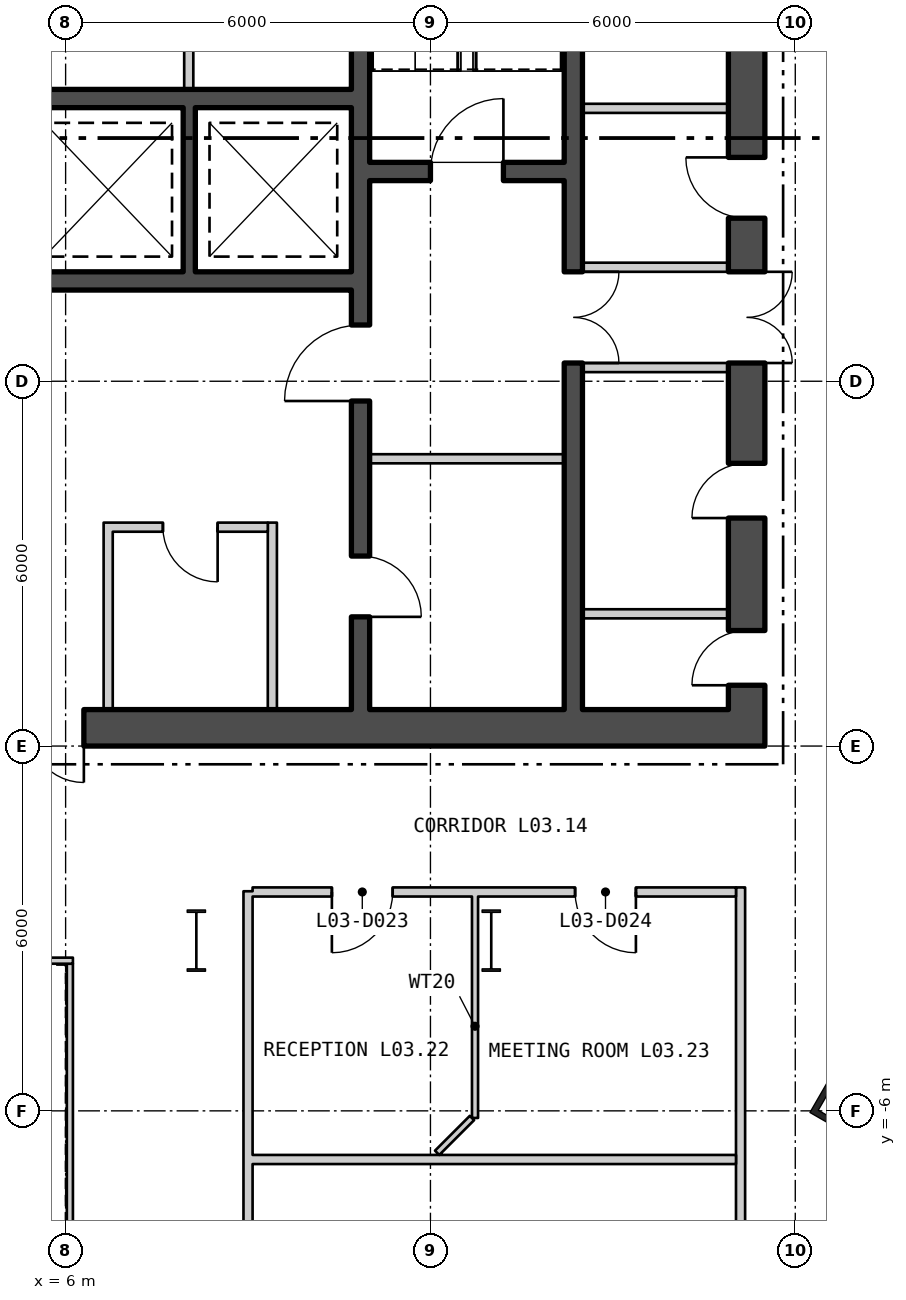
"""IFC4 building model, lengths in metres.
Left out: names, types, materials, properties, quantities, classifications, styles, units other than length and angle.
Written with IfcOpenShell. Run it as: python <this file> out.ifc"""

import sys

from ifc_helpers import new_model, si_unit, direction, frame, frame_2d, origin, origin_2d, place, context, subcontext, project, spatial, rectangle, hollow_rectangle, i_section, extrude, element, fill, save


model = new_model("IFC4")
c1 = context("Model", 3, precision=1e-05, world=origin(), true_north=direction((0.0, 1.0)))
c2 = subcontext(c1, "Body", "Model", "MODEL_VIEW")
j1 = project(units=[si_unit("LENGTHUNIT", "METRE"), si_unit("PLANEANGLEUNIT", "RADIAN")], contexts=[c1])
p1 = place(None, origin())
s1 = spatial("IfcSite", under=j1, at=p1, CompositionType="ELEMENT")
p2 = place(p1, origin())
s2 = spatial("IfcBuilding", under=s1, at=p2, CompositionType="ELEMENT")
p3 = place(p2, frame((0.0, 0.0, 18.6)))
s3 = spatial("IfcBuildingStorey", under=s2, at=p3, CompositionType="ELEMENT", Elevation=18.6)
p4 = place(p3, frame((19.061, -5.807, 0.0), z_axis=(0.0, 0.0, 1.0), x_axis=(0.5, 0.866025403784, 0.0)))
e1 = element("IfcColumn", 1, at=p4, inside=s3, PredefinedType="COLUMN", context=c2, shape_type="SweptSolid", body=[
    extrude(hollow_rectangle(XDim=1.2, YDim=1.2, WallThickness=0.1, at=origin_2d()), origin(), (0.0, 0.0, 1.0), 5.1),
])
for number, where, z_axis, x_axis in (
    (2, (8.15, -3.2, 0.0), (0.0, 0.0, 1.0), (1.0, 0.0, 0.0)),
    (3, (13.0, -3.2, 0.0), (0.0, 0.0, 1.0), (1.0, 0.0, 0.0)),
):
    element("IfcColumn", number, at=place(p3, frame(where, z_axis=z_axis, x_axis=x_axis)), inside=s3, PredefinedType="COLUMN", context=c2, shape_type="SweptSolid", body=[
        extrude(i_section(OverallWidth=0.302, OverallDepth=1.008, WebThickness=0.021, FlangeThickness=0.04, at=origin_2d()), origin(), (0.0, 0.0, 1.0), 5.1),
    ])
p5 = place(p3, frame((6.07, -11.62, 0.0), z_axis=(0.0, 0.0, 1.0), x_axis=(0.0, 1.0, 0.0)))
e4 = element("IfcWall", 4, at=p5, inside=s3, PredefinedType="PARTITIONING", context=c2, shape_type="SweptSolid", body=[
    extrude(rectangle(XDim=8.04, YDim=0.1, at=frame_2d((4.02, 0.0))), origin(), (0.0, 0.0, 1.0), 4.88),
])
p6 = place(p3, frame((6.12, -3.53, 0.0), z_axis=(0.0, 0.0, 1.0), x_axis=(-1.0, 0.0, 0.0)))
e5 = element("IfcWall", 5, at=p6, inside=s3, PredefinedType="PARTITIONING", context=c2, shape_type="SweptSolid", body=[
    extrude(rectangle(XDim=12.24, YDim=0.1, at=frame_2d((6.12, 0.0))), origin(), (0.0, 0.0, 1.0), 4.88),
])
p7 = place(p3, frame((-17.5, 0.3, 0.0), z_axis=(0.0, 0.0, 1.0), x_axis=(1.0, 0.0, 0.0)))
e6 = element("IfcWall", 6, at=p7, inside=s3, PredefinedType="SHEAR", context=c2, shape_type="SweptSolid", body=[
    extrude(rectangle(XDim=35.0, YDim=0.6, at=frame_2d((17.5, 0.0))), origin(), (0.0, 0.0, 1.0), 4.88),
])
p8 = place(p7, frame((12.0, 0.0, 0.0)))
e7 = element("IfcOpeningElement", 7, at=p8, cuts=e6, PredefinedType="OPENING", context=c2, shape_type="SweptSolid", body=[
    extrude(rectangle(XDim=1.8, YDim=2.4, at=frame_2d((0.9, 1.2))), frame((0.0, 0.31, 0.0), z_axis=(0.0, -1.0, 0.0), x_axis=(1.0, 0.0, 0.0)), (0.0, 0.0, 1.0), 0.62),
])
p9 = place(p7, frame((22.0, 0.0, 0.0)))
e8 = element("IfcOpeningElement", 8, at=p9, cuts=e6, PredefinedType="OPENING", context=c2, shape_type="SweptSolid", body=[
    extrude(rectangle(XDim=1.8, YDim=2.4, at=frame_2d((0.9, 1.2))), frame((0.0, 0.31, 0.0), z_axis=(0.0, -1.0, 0.0), x_axis=(1.0, 0.0, 0.0)), (0.0, 0.0, 1.0), 0.62),
])
p10 = place(p3, frame((17.2, 0.6, 0.0), z_axis=(0.0, 0.0, 1.0), x_axis=(0.0, 1.0, 0.0)))
e9 = element("IfcWall", 9, at=p10, inside=s3, PredefinedType="SHEAR", context=c2, shape_type="SweptSolid", body=[
    extrude(rectangle(XDim=16.8, YDim=0.6, at=frame_2d((8.4, 0.0))), origin(), (0.0, 0.0, 1.0), 4.88),
])
p11 = place(p10, frame((5.7, 0.0, 0.0)))
e10 = element("IfcOpeningElement", 10, at=p11, cuts=e9, PredefinedType="OPENING", context=c2, shape_type="SweptSolid", body=[
    extrude(rectangle(XDim=1.5, YDim=2.1, at=frame_2d((0.75, 1.05))), frame((0.0, 0.31, 0.0), z_axis=(0.0, -1.0, 0.0), x_axis=(1.0, 0.0, 0.0)), (0.0, 0.0, 1.0), 0.62),
])
p12 = place(p10, frame((0.4, 0.0, 0.0)))
e11 = element("IfcOpeningElement", 11, at=p12, cuts=e9, PredefinedType="OPENING", context=c2, shape_type="SweptSolid", body=[
    extrude(rectangle(XDim=0.9, YDim=2.1, at=frame_2d((0.45, 1.05))), frame((0.0, 0.31, 0.0), z_axis=(0.0, -1.0, 0.0), x_axis=(1.0, 0.0, 0.0)), (0.0, 0.0, 1.0), 0.62),
])
p13 = place(p10, frame((3.15, 0.0, 0.0)))
e12 = element("IfcOpeningElement", 12, at=p13, cuts=e9, PredefinedType="OPENING", context=c2, shape_type="SweptSolid", body=[
    extrude(rectangle(XDim=0.9, YDim=2.1, at=frame_2d((0.45, 1.05))), frame((0.0, 0.31, 0.0), z_axis=(0.0, -1.0, 0.0), x_axis=(1.0, 0.0, 0.0)), (0.0, 0.0, 1.0), 0.62),
])
p14 = place(p10, frame((8.082, 0.0, 0.0)))
e13 = element("IfcOpeningElement", 13, at=p14, cuts=e9, PredefinedType="OPENING", context=c2, shape_type="SweptSolid", body=[
    extrude(rectangle(XDim=1.0, YDim=2.1, at=frame_2d((0.5, 1.05))), frame((0.0, 0.31, 0.0), z_axis=(0.0, -1.0, 0.0), x_axis=(1.0, 0.0, 0.0)), (0.0, 0.0, 1.0), 0.62),
])
p15 = place(p10, frame((11.801, 0.0, 0.0)))
e14 = element("IfcOpeningElement", 14, at=p15, cuts=e9, PredefinedType="OPENING", context=c2, shape_type="SweptSolid", body=[
    extrude(rectangle(XDim=0.9, YDim=2.1, at=frame_2d((0.45, 1.05))), frame((0.0, 0.31, 0.0), z_axis=(0.0, -1.0, 0.0), x_axis=(1.0, 0.0, 0.0)), (0.0, 0.0, 1.0), 0.62),
])
p16 = place(p10, frame((15.294, 0.0, 0.0)))
e15 = element("IfcOpeningElement", 15, at=p16, cuts=e9, PredefinedType="OPENING", context=c2, shape_type="SweptSolid", body=[
    extrude(rectangle(XDim=0.9, YDim=2.1, at=frame_2d((0.45, 1.05))), frame((0.0, 0.31, 0.0), z_axis=(0.0, -1.0, 0.0), x_axis=(1.0, 0.0, 0.0)), (0.0, 0.0, 1.0), 0.62),
])
p17 = place(p3, frame((10.85, 0.6, 0.0), z_axis=(0.0, 0.0, 1.0), x_axis=(0.0, 1.0, 0.0)))
e16 = element("IfcWall", 16, at=p17, inside=s3, PredefinedType="SHEAR", context=c2, shape_type="SweptSolid", body=[
    extrude(rectangle(XDim=16.8, YDim=0.3, at=frame_2d((8.4, 0.0))), origin(), (0.0, 0.0, 1.0), 4.88),
])
p18 = place(p17, frame((5.075, 0.0, 0.0)))
e17 = element("IfcOpeningElement", 17, at=p18, cuts=e16, PredefinedType="OPENING", context=c2, shape_type="SweptSolid", body=[
    extrude(rectangle(XDim=1.25, YDim=2.1, at=frame_2d((0.625, 1.05))), frame((0.0, 0.16, 0.0), z_axis=(0.0, -1.0, 0.0), x_axis=(1.0, 0.0, 0.0)), (0.0, 0.0, 1.0), 0.32),
])
p19 = place(p17, frame((1.525, 0.0, 0.0)))
e18 = element("IfcOpeningElement", 18, at=p19, cuts=e16, PredefinedType="OPENING", context=c2, shape_type="SweptSolid", body=[
    extrude(rectangle(XDim=1.0, YDim=2.1, at=frame_2d((0.5, 1.05))), frame((0.0, 0.16, 0.0), z_axis=(0.0, -1.0, 0.0), x_axis=(1.0, 0.0, 0.0)), (0.0, 0.0, 1.0), 0.32),
])
p20 = place(p3, frame((14.35, 0.6, 0.0), z_axis=(0.0, 0.0, 1.0), x_axis=(0.0, 1.0, 0.0)))
e19 = element("IfcWall", 19, at=p20, inside=s3, PredefinedType="SHEAR", context=c2, shape_type="SweptSolid", body=[
    extrude(rectangle(XDim=16.8, YDim=0.3, at=frame_2d((8.4, 0.0))), origin(), (0.0, 0.0, 1.0), 4.88),
])
p21 = place(p20, frame((5.7, 0.0, 0.0)))
e20 = element("IfcOpeningElement", 20, at=p21, cuts=e19, PredefinedType="OPENING", context=c2, shape_type="SweptSolid", body=[
    extrude(rectangle(XDim=1.5, YDim=2.1, at=frame_2d((0.75, 1.05))), frame((0.0, 0.16, 0.0), z_axis=(0.0, -1.0, 0.0), x_axis=(1.0, 0.0, 0.0)), (0.0, 0.0, 1.0), 0.32),
])
p22 = place(p3, frame((11.0, 9.45, 0.0), z_axis=(0.0, 0.0, 1.0), x_axis=(1.0, 0.0, 0.0)))
e21 = element("IfcWall", 21, at=p22, inside=s3, PredefinedType="SHEAR", context=c2, shape_type="SweptSolid", body=[
    extrude(rectangle(XDim=3.2, YDim=0.3, at=frame_2d((1.6, 0.0))), origin(), (0.0, 0.0, 1.0), 4.88),
])
p23 = place(p22, frame((1.0, 0.0, 0.0)))
e22 = element("IfcOpeningElement", 22, at=p23, cuts=e21, PredefinedType="OPENING", context=c2, shape_type="SweptSolid", body=[
    extrude(rectangle(XDim=1.2, YDim=2.1, at=frame_2d((0.6, 1.05))), frame((0.0, 0.16, 0.0), z_axis=(0.0, -1.0, 0.0), x_axis=(1.0, 0.0, 0.0)), (0.0, 0.0, 1.0), 0.32),
])
for number, where, z_axis, x_axis in (
    (23, (2.6, 10.65, 0.0), (0.0, 0.0, 1.0), (1.0, 0.0, 0.0)),
    (24, (2.6, 7.65, 0.0), (0.0, 0.0, 1.0), (1.0, 0.0, 0.0)),
):
    element("IfcWall", number, at=place(p3, frame(where, z_axis=z_axis, x_axis=x_axis)), inside=s3, PredefinedType="SHEAR", context=c2, shape_type="SweptSolid", body=[
        extrude(rectangle(XDim=8.1, YDim=0.3, at=frame_2d((4.05, 0.0))), origin(), (0.0, 0.0, 1.0), 4.88),
    ])
p24 = place(p3, frame((8.033, 7.8, 0.0), z_axis=(0.0, 0.0, 1.0), x_axis=(0.0, 1.0, 0.0)))
e25 = element("IfcWall", 25, at=p24, inside=s3, PredefinedType="SHEAR", context=c2, shape_type="SweptSolid", body=[
    extrude(rectangle(XDim=2.7, YDim=0.2, at=frame_2d((1.35, 0.0))), origin(), (0.0, 0.0, 1.0), 4.88),
])
p25 = place(p3, frame((8.025, 10.8, 0.0), z_axis=(0.0, 0.0, 1.0), x_axis=(0.0, 1.0, 0.0)))
e26 = element("IfcWall", 26, at=p25, inside=s3, PredefinedType="PARTITIONING", context=c2, shape_type="SweptSolid", body=[
    extrude(rectangle(XDim=3.6, YDim=0.15, at=frame_2d((1.8, 0.0))), origin(), (0.0, 0.0, 1.0), 4.88),
])
p26 = place(p25, frame((1.175, 0.0, 0.0)))
e27 = element("IfcOpeningElement", 27, at=p26, cuts=e26, PredefinedType="OPENING", context=c2, shape_type="SweptSolid", body=[
    extrude(rectangle(XDim=1.25, YDim=2.1, at=frame_2d((0.625, 1.05))), frame((0.0, 0.085, 0.0), z_axis=(0.0, -1.0, 0.0), x_axis=(1.0, 0.0, 0.0)), (0.0, 0.0, 1.0), 0.17),
])
p27 = place(p3, frame((11.0, 4.725, 0.0), z_axis=(0.0, 0.0, 1.0), x_axis=(1.0, 0.0, 0.0)))
e28 = element("IfcWall", 28, at=p27, inside=s3, PredefinedType="PARTITIONING", context=c2, shape_type="SweptSolid", body=[
    extrude(rectangle(XDim=3.2, YDim=0.15, at=frame_2d((1.6, 0.0))), origin(), (0.0, 0.0, 1.0), 4.88),
])
for number, where, z_axis, x_axis in (
    (29, (14.5, 6.225, 0.0), (0.0, 0.0, 1.0), (1.0, 0.0, 0.0)),
    (30, (14.5, 7.875, 0.0), (0.0, 0.0, 1.0), (1.0, 0.0, 0.0)),
    (31, (14.5, 2.175, 0.0), (0.0, 0.0, 1.0), (1.0, 0.0, 0.0)),
    (32, (14.5, 10.489, 0.0), (0.0, 0.0, 1.0), (1.0, 0.0, 0.0)),
):
    element("IfcWall", number, at=place(p3, frame(where, z_axis=z_axis, x_axis=x_axis)), inside=s3, PredefinedType="PARTITIONING", context=c2, shape_type="SweptSolid", body=[
        extrude(rectangle(XDim=2.4, YDim=0.15, at=frame_2d((1.2, 0.0))), origin(), (0.0, 0.0, 1.0), 4.88),
    ])
for number, where, z_axis, x_axis in (
    (33, (6.7, 0.6, 0.0), (0.0, 0.0, 1.0), (0.0, 1.0, 0.0)),
    (34, (9.4, 0.6, 0.0), (0.0, 0.0, 1.0), (0.0, 1.0, 0.0)),
):
    element("IfcWall", number, at=place(p3, frame(where, z_axis=z_axis, x_axis=x_axis)), inside=s3, PredefinedType="PARTITIONING", context=c2, shape_type="SweptSolid", body=[
        extrude(rectangle(XDim=3.075, YDim=0.15, at=frame_2d((1.538, 0.0))), origin(), (0.0, 0.0, 1.0), 4.88),
    ])
p28 = place(p3, frame((6.775, 3.6, 0.0), z_axis=(0.0, 0.0, 1.0), x_axis=(1.0, 0.0, 0.0)))
e35 = element("IfcWall", 35, at=p28, inside=s3, PredefinedType="PARTITIONING", context=c2, shape_type="SweptSolid", body=[
    extrude(rectangle(XDim=2.55, YDim=0.15, at=frame_2d((1.275, 0.0))), origin(), (0.0, 0.0, 1.0), 4.88),
])
p29 = place(p28, frame((0.825, 0.0, 0.0)))
e36 = element("IfcOpeningElement", 36, at=p29, cuts=e35, PredefinedType="OPENING", context=c2, shape_type="SweptSolid", body=[
    extrude(rectangle(XDim=0.9, YDim=2.1, at=frame_2d((0.45, 1.05))), frame((0.0, 0.085, 0.0), z_axis=(0.0, -1.0, 0.0), x_axis=(1.0, 0.0, 0.0)), (0.0, 0.0, 1.0), 0.17),
])
p30 = place(p3, frame((9.0, -13.675, 0.0), z_axis=(0.0, 0.0, 1.0), x_axis=(0.0, 1.0, 0.0)))
e37 = element("IfcWall", 37, at=p30, inside=s3, PredefinedType="PARTITIONING", context=c2, shape_type="SweptSolid", body=[
    extrude(rectangle(XDim=11.287, YDim=0.15, at=frame_2d((5.644, 0.0))), origin(), (0.0, 0.0, 1.0), 4.88),
])
p31 = place(p30, frame((2.821, 0.0, 0.0)))
e38 = element("IfcOpeningElement", 38, at=p31, cuts=e37, PredefinedType="OPENING", context=c2, shape_type="SweptSolid", body=[
    extrude(rectangle(XDim=1.0, YDim=2.1, at=frame_2d((0.5, 1.05))), frame((0.0, 0.085, 0.0), z_axis=(0.0, -1.0, 0.0), x_axis=(1.0, 0.0, 0.0)), (0.0, 0.0, 1.0), 0.17),
])
p32 = place(p3, frame((9.075, -6.8, 0.0), z_axis=(0.0, 0.0, 1.0), x_axis=(1.0, 0.0, 0.0)))
e39 = element("IfcWall", 39, at=p32, inside=s3, PredefinedType="PARTITIONING", context=c2, shape_type="SweptSolid", body=[
    extrude(rectangle(XDim=7.95, YDim=0.15, at=frame_2d((3.975, 0.0))), origin(), (0.0, 0.0, 1.0), 4.88),
])
p33 = place(p3, frame((9.075, -2.4, 0.0), z_axis=(0.0, 0.0, 1.0), x_axis=(1.0, 0.0, 0.0)))
e40 = element("IfcWall", 40, at=p33, inside=s3, PredefinedType="PARTITIONING", context=c2, shape_type="SweptSolid", body=[
    extrude(rectangle(XDim=7.95, YDim=0.15, at=frame_2d((3.975, 0.0))), origin(), (0.0, 0.0, 1.0), 4.88),
])
p34 = place(p33, frame((1.304, 0.0, 0.0)))
e41 = element("IfcOpeningElement", 41, at=p34, cuts=e40, PredefinedType="OPENING", context=c2, shape_type="SweptSolid", body=[
    extrude(rectangle(XDim=1.0, YDim=2.1, at=frame_2d((0.5, 1.05))), frame((0.0, 0.085, 0.0), z_axis=(0.0, -1.0, 0.0), x_axis=(1.0, 0.0, 0.0)), (0.0, 0.0, 1.0), 0.17),
])
p35 = place(p33, frame((5.304, 0.0, 0.0)))
e42 = element("IfcOpeningElement", 42, at=p35, cuts=e40, PredefinedType="OPENING", context=c2, shape_type="SweptSolid", body=[
    extrude(rectangle(XDim=1.0, YDim=2.1, at=frame_2d((0.5, 1.05))), frame((0.0, 0.085, 0.0), z_axis=(0.0, -1.0, 0.0), x_axis=(1.0, 0.0, 0.0)), (0.0, 0.0, 1.0), 0.17),
])
p36 = place(p3, frame((12.11, -6.69, 0.0), z_axis=(0.0, 0.0, 1.0), x_axis=(0.707106781187, 0.707106781187, 0.0)))
e43 = element("IfcWall", 43, at=p36, inside=s3, PredefinedType="PARTITIONING", context=c2, shape_type="SweptSolid", body=[
    extrude(rectangle(XDim=0.81, YDim=0.1, at=frame_2d((0.405, 0.0))), origin(), (0.0, 0.0, 1.0), 4.88),
])
p37 = place(p3, frame((12.733, -6.117, 0.0), z_axis=(0.0, 0.0, 1.0), x_axis=(0.0, 1.0, 0.0)))
e44 = element("IfcWall", 44, at=p37, inside=s3, PredefinedType="PARTITIONING", context=c2, shape_type="SweptSolid", body=[
    extrude(rectangle(XDim=3.017, YDim=0.1, at=frame_2d((1.508, 0.0))), origin(), (0.0, 0.0, 1.0), 4.19),
])
p38 = place(p3, frame((12.733, -3.1, 0.0), z_axis=(0.0, 0.0, 1.0), x_axis=(0.0, 1.0, 0.0)))
e45 = element("IfcWall", 45, at=p38, inside=s3, PredefinedType="PARTITIONING", context=c2, shape_type="SweptSolid", body=[
    extrude(rectangle(XDim=0.625, YDim=0.1, at=frame_2d((0.312, 0.0))), origin(), (0.0, 0.0, 1.0), 4.28),
])
p39 = place(p3, frame((17.1, -21.375, 0.0), z_axis=(0.0, 0.0, 1.0), x_axis=(0.0, 1.0, 0.0)))
e46 = element("IfcWall", 46, at=p39, inside=s3, PredefinedType="PARTITIONING", context=c2, shape_type="SweptSolid", body=[
    extrude(rectangle(XDim=19.05, YDim=0.15, at=frame_2d((9.525, 0.0))), origin(), (0.0, 0.0, 1.0), 4.88),
])
p40 = place(p23, origin())
e47 = element("IfcDoor", 47, at=p40, inside=s3, OperationType="SINGLE_SWING_LEFT", PredefinedType="DOOR", context=c2, shape_type="SweptSolid", body=[
    extrude(rectangle(XDim=1.2, YDim=2.1, at=frame_2d((0.6, 1.05))), frame((0.0, 0.025, 0.0), z_axis=(0.0, -1.0, 0.0), x_axis=(1.0, 0.0, 0.0)), (0.0, 0.0, 1.0), 0.05),
])
fill(e22, e47)
p41 = place(p18, origin())
e48 = element("IfcDoor", 48, at=p41, inside=s3, OperationType="SINGLE_SWING_RIGHT", PredefinedType="DOOR", context=c2, shape_type="SweptSolid", body=[
    extrude(rectangle(XDim=1.25, YDim=2.1, at=frame_2d((0.625, 1.05))), frame((0.0, 0.025, 0.0), z_axis=(0.0, -1.0, 0.0), x_axis=(1.0, 0.0, 0.0)), (0.0, 0.0, 1.0), 0.05),
])
fill(e17, e48)
p42 = place(p19, origin())
e49 = element("IfcDoor", 49, at=p42, inside=s3, OperationType="SINGLE_SWING_LEFT", PredefinedType="DOOR", context=c2, shape_type="SweptSolid", body=[
    extrude(rectangle(XDim=1.0, YDim=2.1, at=frame_2d((0.5, 1.05))), frame((0.0, 0.025, 0.0), z_axis=(0.0, -1.0, 0.0), x_axis=(1.0, 0.0, 0.0)), (0.0, 0.0, 1.0), 0.05),
])
fill(e18, e49)
p43 = place(p21, origin())
e50 = element("IfcDoor", 50, at=p43, inside=s3, OperationType="DOUBLE_DOOR_SINGLE_SWING", PredefinedType="DOOR", context=c2, shape_type="SweptSolid", body=[
    extrude(rectangle(XDim=1.5, YDim=2.1, at=frame_2d((0.75, 1.05))), frame((0.0, 0.025, 0.0), z_axis=(0.0, -1.0, 0.0), x_axis=(1.0, 0.0, 0.0)), (0.0, 0.0, 1.0), 0.05),
])
fill(e20, e50)
p44 = place(p11, origin())
e51 = element("IfcDoor", 51, at=p44, inside=s3, OperationType="DOUBLE_DOOR_SINGLE_SWING", PredefinedType="DOOR", context=c2, shape_type="SweptSolid", body=[
    extrude(rectangle(XDim=1.5, YDim=2.1, at=frame_2d((0.75, 1.05))), frame((0.0, 0.025, 0.0), z_axis=(0.0, -1.0, 0.0), x_axis=(1.0, 0.0, 0.0)), (0.0, 0.0, 1.0), 0.05),
])
fill(e10, e51)
p45 = place(p12, origin())
e52 = element("IfcDoor", 52, at=p45, inside=s3, OperationType="SINGLE_SWING_RIGHT", PredefinedType="DOOR", context=c2, shape_type="SweptSolid", body=[
    extrude(rectangle(XDim=0.9, YDim=2.1, at=frame_2d((0.45, 1.05))), frame((0.0, 0.025, 0.0), z_axis=(0.0, -1.0, 0.0), x_axis=(1.0, 0.0, 0.0)), (0.0, 0.0, 1.0), 0.05),
])
fill(e11, e52)
p46 = place(p13, origin())
e53 = element("IfcDoor", 53, at=p46, inside=s3, OperationType="SINGLE_SWING_RIGHT", PredefinedType="DOOR", context=c2, shape_type="SweptSolid", body=[
    extrude(rectangle(XDim=0.9, YDim=2.1, at=frame_2d((0.45, 1.05))), frame((0.0, 0.025, 0.0), z_axis=(0.0, -1.0, 0.0), x_axis=(1.0, 0.0, 0.0)), (0.0, 0.0, 1.0), 0.05),
])
fill(e12, e53)
p47 = place(p14, origin())
e54 = element("IfcDoor", 54, at=p47, inside=s3, OperationType="SINGLE_SWING_LEFT", PredefinedType="DOOR", context=c2, shape_type="SweptSolid", body=[
    extrude(rectangle(XDim=1.0, YDim=2.1, at=frame_2d((0.5, 1.05))), frame((0.0, 0.025, 0.0), z_axis=(0.0, -1.0, 0.0), x_axis=(1.0, 0.0, 0.0)), (0.0, 0.0, 1.0), 0.05),
])
fill(e13, e54)
p48 = place(p29, origin())
e55 = element("IfcDoor", 55, at=p48, inside=s3, OperationType="SINGLE_SWING_RIGHT", PredefinedType="DOOR", context=c2, shape_type="SweptSolid", body=[
    extrude(rectangle(XDim=0.9, YDim=2.1, at=frame_2d((0.45, 1.05))), frame((0.0, 0.025, 0.0), z_axis=(0.0, -1.0, 0.0), x_axis=(1.0, 0.0, 0.0)), (0.0, 0.0, 1.0), 0.05),
])
fill(e36, e55)
p49 = place(p9, origin())
e56 = element("IfcDoor", 56, at=p49, inside=s3, OperationType="DOUBLE_DOOR_SINGLE_SWING", PredefinedType="DOOR", context=c2, shape_type="SweptSolid", body=[
    extrude(rectangle(XDim=1.8, YDim=2.4, at=frame_2d((0.9, 1.2))), frame((0.0, 0.025, 0.0), z_axis=(0.0, -1.0, 0.0), x_axis=(1.0, 0.0, 0.0)), (0.0, 0.0, 1.0), 0.05),
])
fill(e8, e56)
p50 = place(p34, origin())
e57 = element("IfcDoor", 57, at=p50, inside=s3, OperationType="SINGLE_SWING_LEFT", PredefinedType="DOOR", context=c2, shape_type="SweptSolid", body=[
    extrude(rectangle(XDim=1.0, YDim=2.1, at=frame_2d((0.5, 1.05))), frame((0.0, 0.025, 0.0), z_axis=(0.0, -1.0, 0.0), x_axis=(1.0, 0.0, 0.0)), (0.0, 0.0, 1.0), 0.05),
])
fill(e41, e57)
p51 = place(p35, origin())
e58 = element("IfcDoor", 58, at=p51, inside=s3, OperationType="SINGLE_SWING_RIGHT", PredefinedType="DOOR", context=c2, shape_type="SweptSolid", body=[
    extrude(rectangle(XDim=1.0, YDim=2.1, at=frame_2d((0.5, 1.05))), frame((0.0, 0.025, 0.0), z_axis=(0.0, -1.0, 0.0), x_axis=(1.0, 0.0, 0.0)), (0.0, 0.0, 1.0), 0.05),
])
fill(e42, e58)
save(model, sys.argv[1])
